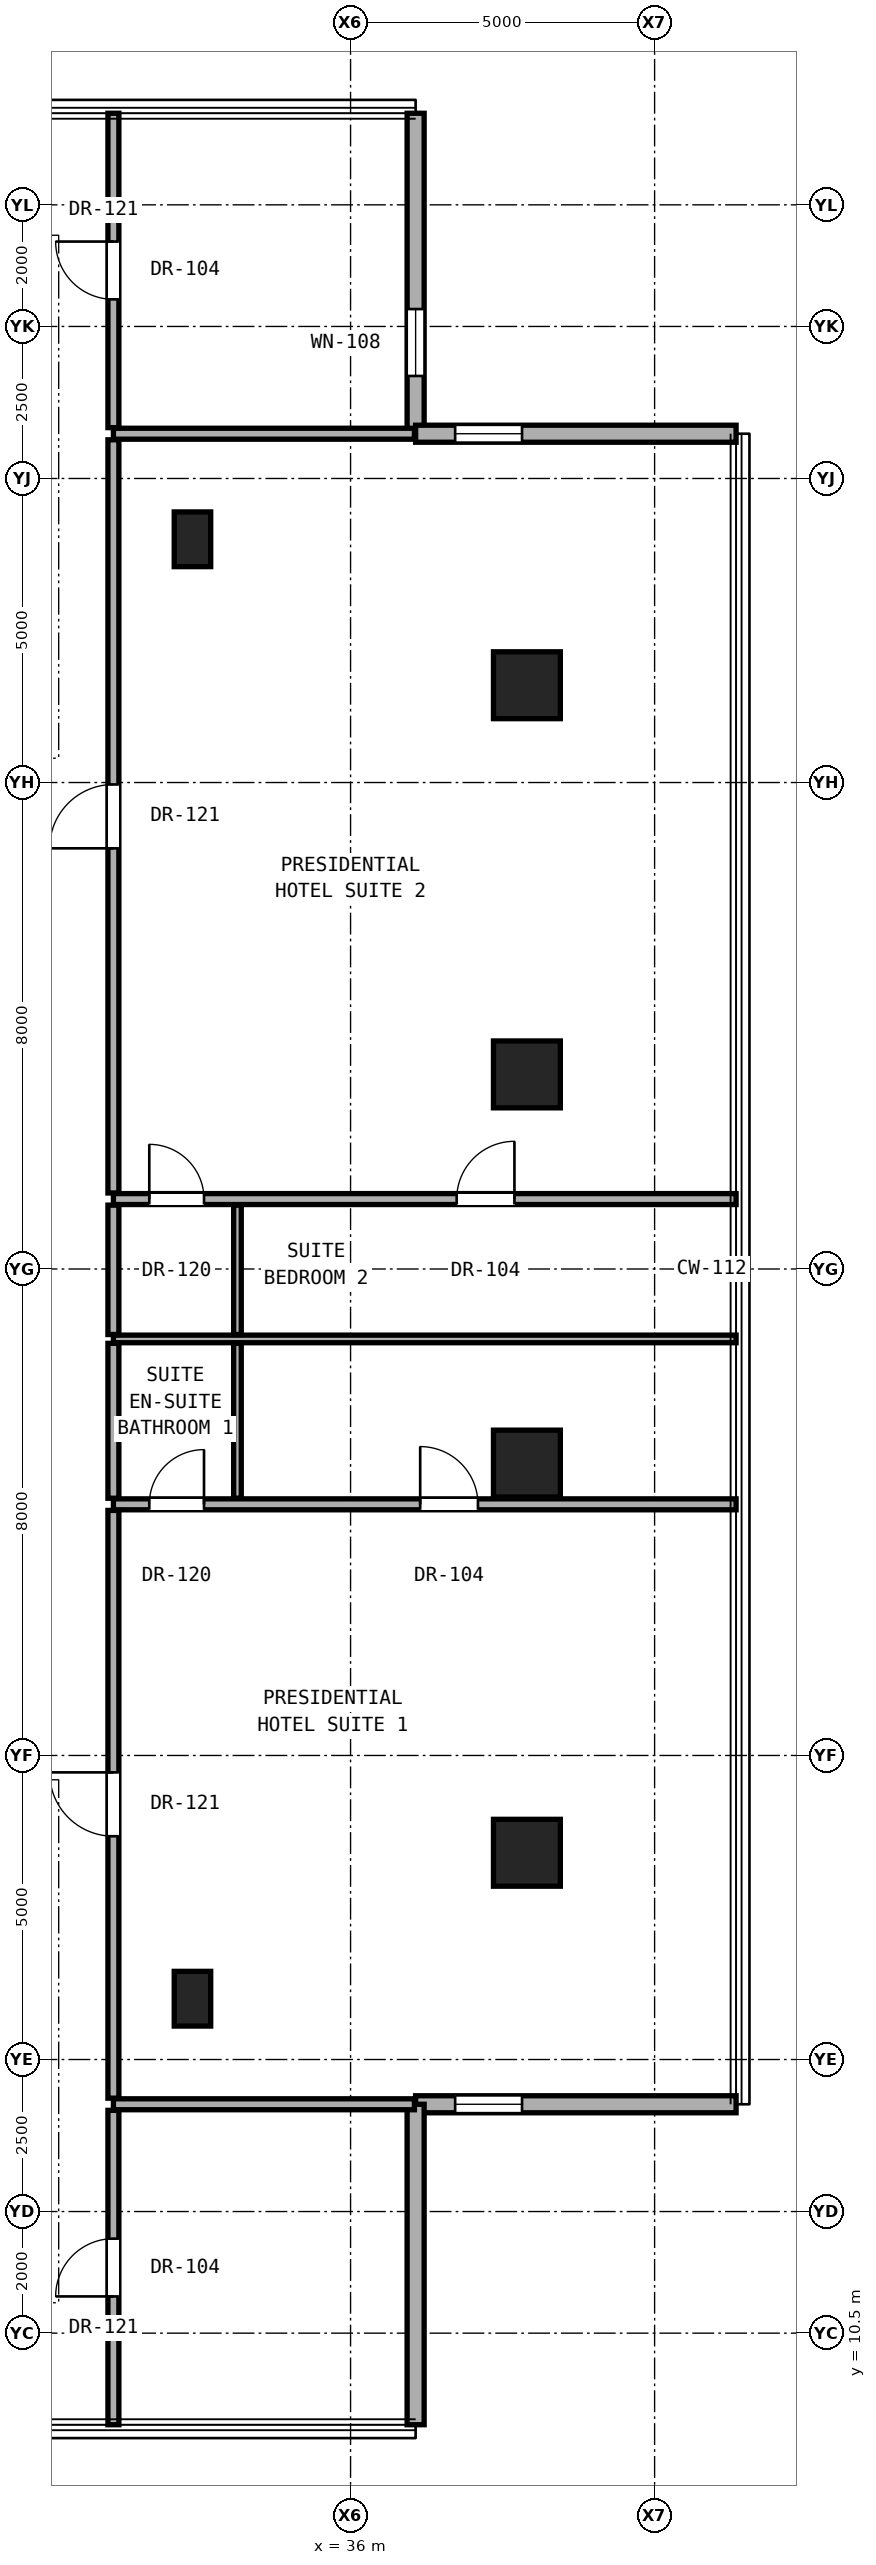
"""IFC4 building model, lengths in metres.
Left out: names, types, materials, properties, quantities, classifications, styles, units other than length and angle.
Written with IfcOpenShell. Run it as: python <this file> out.ifc"""

import sys

from ifc_helpers import new_model, si_unit, direction, frame, frame_2d, origin, origin_2d, place, context, subcontext, project, spatial, rectangle, hollow_rectangle, extrude, element, fill, save


model = new_model("IFC4")
c1 = context("Model", 3, precision=1e-05, world=origin(), true_north=direction((0.0, 1.0)))
c2 = subcontext(c1, "Body", "Model", "MODEL_VIEW")
j1 = project(units=[si_unit("LENGTHUNIT", "METRE"), si_unit("PLANEANGLEUNIT", "RADIAN")], contexts=[c1])
p1 = place(None, origin())
s1 = spatial("IfcSite", under=j1, at=p1, CompositionType="ELEMENT")
p2 = place(p1, origin())
s2 = spatial("IfcBuilding", under=s1, at=p2, CompositionType="ELEMENT")
p3 = place(p2, frame((0.0, 0.0, 141.2)))
s3 = spatial("IfcBuildingStorey", under=s2, at=p3, CompositionType="ELEMENT", Elevation=141.2)
for number, where, z_axis, x_axis in (
    (1, (38.9, 18.4, 0.0), (0.0, 0.0, 1.0), (1.0, 0.0, 0.0)),
    (2, (38.9, 24.8, 0.0), (0.0, 0.0, 1.0), (1.0, 0.0, 0.0)),
    (3, (38.9, 31.2, 0.0), (0.0, 0.0, 1.0), (1.0, 0.0, 0.0)),
    (4, (38.9, 37.6, 0.0), (0.0, 0.0, 1.0), (1.0, 0.0, 0.0)),
):
    element("IfcColumn", number, at=place(p3, frame(where, z_axis=z_axis, x_axis=x_axis)), inside=s3, PredefinedType="COLUMN", context=c2, shape_type="SweptSolid", body=[
        extrude(hollow_rectangle(XDim=1.1, YDim=1.1, WallThickness=0.06, at=origin_2d()), origin(), (0.0, 0.0, 1.0), 3.3),
    ])
for number, where, z_axis, x_axis in (
    (5, (33.4, 16.0, 0.0), (0.0, 0.0, 1.0), (1.0, 0.0, 0.0)),
    (6, (33.4, 40.0, 0.0), (0.0, 0.0, 1.0), (1.0, 0.0, 0.0)),
):
    element("IfcColumn", number, at=place(p3, frame(where, z_axis=z_axis, x_axis=x_axis)), inside=s3, PredefinedType="PILASTER", context=c2, shape_type="SweptSolid", body=[
        extrude(rectangle(XDim=0.6, YDim=0.9, at=origin_2d()), origin(), (0.0, 0.0, 1.0), 3.3),
    ])
p4 = place(p3, frame((37.07, 41.736, 0.0), z_axis=(0.0, 0.0, 1.0), x_axis=(0.0, 1.0, 0.0)))
e7 = element("IfcWall", 7, at=p4, inside=s3, PredefinedType="SOLIDWALL", context=c2, shape_type="SweptSolid", body=[
    extrude(rectangle(XDim=5.27, YDim=0.28, at=frame_2d((2.635, 0.0))), origin(), (0.0, 0.0, 1.0), 3.06),
])
p5 = place(p4, frame((0.95, 0.0, 0.85)))
e8 = element("IfcOpeningElement", 8, at=p5, cuts=e7, PredefinedType="OPENING", context=c2, shape_type="SweptSolid", body=[
    extrude(rectangle(XDim=1.1, YDim=2.0, at=frame_2d((0.55, 1.0))), frame((0.0, 0.15, 0.0), z_axis=(0.0, -1.0, 0.0), x_axis=(1.0, 0.0, 0.0)), (0.0, 0.0, 1.0), 0.3),
])
p6 = place(p3, frame((37.07, 14.264, 0.0), z_axis=(0.0, 0.0, 1.0), x_axis=(1.0, 0.0, 0.0)))
e9 = element("IfcWall", 9, at=p6, inside=s3, PredefinedType="SOLIDWALL", context=c2, shape_type="SweptSolid", body=[
    extrude(rectangle(XDim=5.27, YDim=0.28, at=frame_2d((2.635, 0.0))), origin(), (0.0, 0.0, 1.0), 3.06),
])
p7 = place(p6, frame((0.65, 0.0, 0.85)))
e10 = element("IfcOpeningElement", 10, at=p7, cuts=e9, PredefinedType="OPENING", context=c2, shape_type="SweptSolid", body=[
    extrude(rectangle(XDim=1.1, YDim=2.0, at=frame_2d((0.55, 1.0))), frame((0.0, 0.15, 0.0), z_axis=(0.0, -1.0, 0.0), x_axis=(1.0, 0.0, 0.0)), (0.0, 0.0, 1.0), 0.3),
])
p8 = place(p3, frame((37.07, 8.994, 0.0), z_axis=(0.0, 0.0, 1.0), x_axis=(0.0, 1.0, 0.0)))
e11 = element("IfcWall", 11, at=p8, inside=s3, PredefinedType="SOLIDWALL", context=c2, shape_type="SweptSolid", body=[
    extrude(rectangle(XDim=5.27, YDim=0.28, at=frame_2d((2.635, 0.0))), origin(), (0.0, 0.0, 1.0), 3.06),
])
p9 = place(p3, frame((42.34, 41.736, 0.0), z_axis=(0.0, 0.0, 1.0), x_axis=(-1.0, 0.0, 0.0)))
e12 = element("IfcWall", 12, at=p9, inside=s3, PredefinedType="SOLIDWALL", context=c2, shape_type="SweptSolid", body=[
    extrude(rectangle(XDim=5.27, YDim=0.28, at=frame_2d((2.635, 0.0))), origin(), (0.0, 0.0, 1.0), 3.06),
])
p10 = place(p9, frame((3.52, 0.0, 0.85)))
e13 = element("IfcOpeningElement", 13, at=p10, cuts=e12, PredefinedType="OPENING", context=c2, shape_type="SweptSolid", body=[
    extrude(rectangle(XDim=1.1, YDim=2.0, at=frame_2d((0.55, 1.0))), frame((0.0, 0.15, 0.0), z_axis=(0.0, -1.0, 0.0), x_axis=(1.0, 0.0, 0.0)), (0.0, 0.0, 1.0), 0.3),
])
p11 = place(p3, frame((32.1, 14.264, 0.0), z_axis=(0.0, 0.0, 1.0), x_axis=(1.0, 0.0, 0.0)))
e14 = element("IfcWall", 14, at=p11, inside=s3, PredefinedType="PARTITIONING", context=c2, shape_type="SweptSolid", body=[
    extrude(rectangle(XDim=4.95, YDim=0.18, at=frame_2d((2.475, 0.0))), origin(), (0.0, 0.0, 1.0), 3.08),
])
p12 = place(p3, frame((32.1, 24.13, 0.0), z_axis=(0.0, 0.0, 1.0), x_axis=(1.0, 0.0, 0.0)))
e15 = element("IfcWall", 15, at=p12, inside=s3, PredefinedType="PARTITIONING", context=c2, shape_type="SweptSolid", body=[
    extrude(rectangle(XDim=10.24, YDim=0.18, at=frame_2d((5.12, 0.0))), origin(), (0.0, 0.0, 1.0), 2.299),
])
p13 = place(p12, frame((5.045, 0.0, 0.0)))
e16 = element("IfcOpeningElement", 16, at=p13, cuts=e15, PredefinedType="OPENING", context=c2, shape_type="SweptSolid", body=[
    extrude(rectangle(XDim=0.95, YDim=2.15, at=frame_2d((0.475, 1.075))), frame((0.0, 0.1, 0.0), z_axis=(0.0, -1.0, 0.0), x_axis=(1.0, 0.0, 0.0)), (0.0, 0.0, 1.0), 0.2),
])
p14 = place(p12, frame((0.59, 0.0, 0.0)))
e17 = element("IfcOpeningElement", 17, at=p14, cuts=e15, PredefinedType="OPENING", context=c2, shape_type="SweptSolid", body=[
    extrude(rectangle(XDim=0.9, YDim=2.1, at=frame_2d((0.45, 1.05))), frame((0.0, 0.1, 0.0), z_axis=(0.0, -1.0, 0.0), x_axis=(1.0, 0.0, 0.0)), (0.0, 0.0, 1.0), 0.2),
])
p15 = place(p3, frame((32.1, 26.85, 0.0), z_axis=(0.0, 0.0, 1.0), x_axis=(1.0, 0.0, 0.0)))
e18 = element("IfcWall", 18, at=p15, inside=s3, PredefinedType="PARTITIONING", context=c2, shape_type="SweptSolid", body=[
    extrude(rectangle(XDim=10.24, YDim=0.125, at=frame_2d((5.12, 0.0))), origin(), (0.0, 0.0, 1.0), 2.299),
])
p16 = place(p3, frame((32.1, 29.15, 0.0), z_axis=(0.0, 0.0, 1.0), x_axis=(1.0, 0.0, 0.0)))
e19 = element("IfcWall", 19, at=p16, inside=s3, PredefinedType="PARTITIONING", context=c2, shape_type="SweptSolid", body=[
    extrude(rectangle(XDim=10.24, YDim=0.18, at=frame_2d((5.12, 0.0))), origin(), (0.0, 0.0, 1.0), 2.299),
])
p17 = place(p16, frame((5.645, 0.0, 0.0)))
e20 = element("IfcOpeningElement", 20, at=p17, cuts=e19, PredefinedType="OPENING", context=c2, shape_type="SweptSolid", body=[
    extrude(rectangle(XDim=0.95, YDim=2.15, at=frame_2d((0.475, 1.075))), frame((0.0, 0.1, 0.0), z_axis=(0.0, -1.0, 0.0), x_axis=(1.0, 0.0, 0.0)), (0.0, 0.0, 1.0), 0.2),
])
p18 = place(p16, frame((0.59, 0.0, 0.0)))
e21 = element("IfcOpeningElement", 21, at=p18, cuts=e19, PredefinedType="OPENING", context=c2, shape_type="SweptSolid", body=[
    extrude(rectangle(XDim=0.9, YDim=2.1, at=frame_2d((0.45, 1.05))), frame((0.0, 0.1, 0.0), z_axis=(0.0, -1.0, 0.0), x_axis=(1.0, 0.0, 0.0)), (0.0, 0.0, 1.0), 0.2),
])
p19 = place(p3, frame((32.1, 41.736, 0.0), z_axis=(0.0, 0.0, 1.0), x_axis=(1.0, 0.0, 0.0)))
e22 = element("IfcWall", 22, at=p19, inside=s3, PredefinedType="PARTITIONING", context=c2, shape_type="SweptSolid", body=[
    extrude(rectangle(XDim=4.95, YDim=0.18, at=frame_2d((2.475, 0.0))), origin(), (0.0, 0.0, 1.0), 3.08),
])
p20 = place(p3, frame((32.1, 8.994, 0.0), z_axis=(0.0, 0.0, 1.0), x_axis=(0.0, 1.0, 0.0)))
e23 = element("IfcWall", 23, at=p20, inside=s3, PredefinedType="PARTITIONING", context=c2, shape_type="SweptSolid", body=[
    extrude(rectangle(XDim=5.17, YDim=0.18, at=frame_2d((2.585, 0.0))), origin(), (0.0, 0.0, 1.0), 3.08),
])
p21 = place(p20, frame((2.11, 0.0, 0.0)))
e24 = element("IfcOpeningElement", 24, at=p21, cuts=e23, PredefinedType="OPENING", context=c2, shape_type="SweptSolid", body=[
    extrude(rectangle(XDim=0.95, YDim=2.15, at=frame_2d((0.475, 1.075))), frame((0.0, 0.1, 0.0), z_axis=(0.0, -1.0, 0.0), x_axis=(1.0, 0.0, 0.0)), (0.0, 0.0, 1.0), 0.2),
])
p22 = place(p3, frame((32.1, 14.364, 0.0), z_axis=(0.0, 0.0, 1.0), x_axis=(0.0, 1.0, 0.0)))
e25 = element("IfcWall", 25, at=p22, inside=s3, PredefinedType="PARTITIONING", context=c2, shape_type="SweptSolid", body=[
    extrude(rectangle(XDim=9.666, YDim=0.18, at=frame_2d((4.833, 0.0))), origin(), (0.0, 0.0, 1.0), 2.456),
])
p23 = place(p22, frame((4.308, 0.0, 0.0)))
e26 = element("IfcOpeningElement", 26, at=p23, cuts=e25, PredefinedType="OPENING", context=c2, shape_type="SweptSolid", body=[
    extrude(rectangle(XDim=1.05, YDim=2.2, at=frame_2d((0.525, 1.1))), frame((0.0, 0.1, 0.0), z_axis=(0.0, -1.0, 0.0), x_axis=(1.0, 0.0, 0.0)), (0.0, 0.0, 1.0), 0.2),
])
p24 = place(p3, frame((32.1, 24.23, 0.0), z_axis=(0.0, 0.0, 1.0), x_axis=(0.0, 1.0, 0.0)))
e27 = element("IfcWall", 27, at=p24, inside=s3, PredefinedType="PARTITIONING", context=c2, shape_type="SweptSolid", body=[
    extrude(rectangle(XDim=2.548, YDim=0.18, at=frame_2d((1.274, 0.0))), origin(), (0.0, 0.0, 1.0), 2.299),
])
p25 = place(p3, frame((32.1, 26.923, 0.0), z_axis=(0.0, 0.0, 1.0), x_axis=(0.0, 1.0, 0.0)))
e28 = element("IfcWall", 28, at=p25, inside=s3, PredefinedType="PARTITIONING", context=c2, shape_type="SweptSolid", body=[
    extrude(rectangle(XDim=2.127, YDim=0.18, at=frame_2d((1.064, 0.0))), origin(), (0.0, 0.0, 1.0), 3.08),
])
p26 = place(p3, frame((32.1, 29.25, 0.0), z_axis=(0.0, 0.0, 1.0), x_axis=(0.0, 1.0, 0.0)))
e29 = element("IfcWall", 29, at=p26, inside=s3, PredefinedType="PARTITIONING", context=c2, shape_type="SweptSolid", body=[
    extrude(rectangle(XDim=12.386, YDim=0.18, at=frame_2d((6.193, 0.0))), origin(), (0.0, 0.0, 1.0), 2.299),
])
p27 = place(p26, frame((5.668, 0.0, 0.0)))
e30 = element("IfcOpeningElement", 30, at=p27, cuts=e29, PredefinedType="OPENING", context=c2, shape_type="SweptSolid", body=[
    extrude(rectangle(XDim=1.05, YDim=2.2, at=frame_2d((0.525, 1.1))), frame((0.0, 0.1, 0.0), z_axis=(0.0, -1.0, 0.0), x_axis=(1.0, 0.0, 0.0)), (0.0, 0.0, 1.0), 0.2),
])
p28 = place(p3, frame((32.1, 41.836, 0.0), z_axis=(0.0, 0.0, 1.0), x_axis=(0.0, 1.0, 0.0)))
e31 = element("IfcWall", 31, at=p28, inside=s3, PredefinedType="PARTITIONING", context=c2, shape_type="SweptSolid", body=[
    extrude(rectangle(XDim=5.17, YDim=0.18, at=frame_2d((2.585, 0.0))), origin(), (0.0, 0.0, 1.0), 3.08),
])
p29 = place(p28, frame((2.11, 0.0, 0.0)))
e32 = element("IfcOpeningElement", 32, at=p29, cuts=e31, PredefinedType="OPENING", context=c2, shape_type="SweptSolid", body=[
    extrude(rectangle(XDim=0.95, YDim=2.15, at=frame_2d((0.475, 1.075))), frame((0.0, 0.1, 0.0), z_axis=(0.0, -1.0, 0.0), x_axis=(1.0, 0.0, 0.0)), (0.0, 0.0, 1.0), 0.2),
])
p30 = place(p3, frame((34.14, 24.23, 0.0), z_axis=(0.0, 0.0, 1.0), x_axis=(0.0, 1.0, 0.0)))
e33 = element("IfcWall", 33, at=p30, inside=s3, PredefinedType="PARTITIONING", context=c2, shape_type="SweptSolid", body=[
    extrude(rectangle(XDim=2.548, YDim=0.125, at=frame_2d((1.274, 0.0))), origin(), (0.0, 0.0, 1.0), 2.299),
])
p31 = place(p3, frame((34.14, 26.923, 0.0), z_axis=(0.0, 0.0, 1.0), x_axis=(0.0, 1.0, 0.0)))
e34 = element("IfcWall", 34, at=p31, inside=s3, PredefinedType="PARTITIONING", context=c2, shape_type="SweptSolid", body=[
    extrude(rectangle(XDim=2.127, YDim=0.125, at=frame_2d((1.064, 0.0))), origin(), (0.0, 0.0, 1.0), 3.08),
])
p32 = place(p5, origin())
e35 = element("IfcWindow", 35, at=p32, inside=s3, PartitioningType="SINGLE_PANEL", PredefinedType="WINDOW", context=c2, shape_type="SweptSolid", body=[
    extrude(rectangle(XDim=1.1, YDim=2.0, at=frame_2d((0.55, 1.0))), frame((0.0, 0.03, 0.0), z_axis=(0.0, -1.0, 0.0), x_axis=(1.0, 0.0, 0.0)), (0.0, 0.0, 1.0), 0.06),
])
fill(e8, e35)
p33 = place(p7, origin())
e36 = element("IfcWindow", 36, at=p33, inside=s3, PartitioningType="SINGLE_PANEL", PredefinedType="WINDOW", context=c2, shape_type="SweptSolid", body=[
    extrude(rectangle(XDim=1.1, YDim=2.0, at=frame_2d((0.55, 1.0))), frame((0.0, 0.03, 0.0), z_axis=(0.0, -1.0, 0.0), x_axis=(1.0, 0.0, 0.0)), (0.0, 0.0, 1.0), 0.06),
])
fill(e10, e36)
p34 = place(p10, origin())
e37 = element("IfcWindow", 37, at=p34, inside=s3, PartitioningType="SINGLE_PANEL", PredefinedType="WINDOW", context=c2, shape_type="SweptSolid", body=[
    extrude(rectangle(XDim=1.1, YDim=2.0, at=frame_2d((0.55, 1.0))), frame((0.0, 0.03, 0.0), z_axis=(0.0, -1.0, 0.0), x_axis=(1.0, 0.0, 0.0)), (0.0, 0.0, 1.0), 0.06),
])
fill(e13, e37)
p35 = place(p23, origin())
e38 = element("IfcDoor", 38, at=p35, inside=s3, OperationType="SINGLE_SWING_RIGHT", PredefinedType="DOOR", context=c2, shape_type="SweptSolid", body=[
    extrude(rectangle(XDim=1.05, YDim=2.2, at=frame_2d((0.525, 1.1))), frame((0.0, 0.025, 0.0), z_axis=(0.0, -1.0, 0.0), x_axis=(1.0, 0.0, 0.0)), (0.0, 0.0, 1.0), 0.05),
])
fill(e26, e38)
p36 = place(p13, origin())
e39 = element("IfcDoor", 39, at=p36, inside=s3, OperationType="SINGLE_SWING_LEFT", PredefinedType="DOOR", context=c2, shape_type="SweptSolid", body=[
    extrude(rectangle(XDim=0.95, YDim=2.15, at=frame_2d((0.475, 1.075))), frame((0.0, 0.025, 0.0), z_axis=(0.0, -1.0, 0.0), x_axis=(1.0, 0.0, 0.0)), (0.0, 0.0, 1.0), 0.05),
])
fill(e16, e39)
p37 = place(p14, origin())
e40 = element("IfcDoor", 40, at=p37, inside=s3, OperationType="SINGLE_SWING_RIGHT", PredefinedType="DOOR", context=c2, shape_type="SweptSolid", body=[
    extrude(rectangle(XDim=0.9, YDim=2.1, at=frame_2d((0.45, 1.05))), frame((0.0, 0.025, 0.0), z_axis=(0.0, -1.0, 0.0), x_axis=(1.0, 0.0, 0.0)), (0.0, 0.0, 1.0), 0.05),
])
fill(e17, e40)
p38 = place(p27, origin())
e41 = element("IfcDoor", 41, at=p38, inside=s3, OperationType="SINGLE_SWING_LEFT", PredefinedType="DOOR", context=c2, shape_type="SweptSolid", body=[
    extrude(rectangle(XDim=1.05, YDim=2.2, at=frame_2d((0.525, 1.1))), frame((0.0, 0.025, 0.0), z_axis=(0.0, -1.0, 0.0), x_axis=(1.0, 0.0, 0.0)), (0.0, 0.0, 1.0), 0.05),
])
fill(e30, e41)
p39 = place(p17, origin())
e42 = element("IfcDoor", 42, at=p39, inside=s3, OperationType="SINGLE_SWING_RIGHT", PredefinedType="DOOR", context=c2, shape_type="SweptSolid", body=[
    extrude(rectangle(XDim=0.95, YDim=2.15, at=frame_2d((0.475, 1.075))), frame((0.0, 0.025, 0.0), z_axis=(0.0, -1.0, 0.0), x_axis=(1.0, 0.0, 0.0)), (0.0, 0.0, 1.0), 0.05),
])
fill(e20, e42)
p40 = place(p18, origin())
e43 = element("IfcDoor", 43, at=p40, inside=s3, OperationType="SINGLE_SWING_LEFT", PredefinedType="DOOR", context=c2, shape_type="SweptSolid", body=[
    extrude(rectangle(XDim=0.9, YDim=2.1, at=frame_2d((0.45, 1.05))), frame((0.0, 0.025, 0.0), z_axis=(0.0, -1.0, 0.0), x_axis=(1.0, 0.0, 0.0)), (0.0, 0.0, 1.0), 0.05),
])
fill(e21, e43)
p41 = place(p21, origin())
e44 = element("IfcDoor", 44, at=p41, inside=s3, OperationType="SINGLE_SWING_LEFT", PredefinedType="DOOR", context=c2, shape_type="SweptSolid", body=[
    extrude(rectangle(XDim=0.95, YDim=2.15, at=frame_2d((0.475, 1.075))), frame((0.0, 0.025, 0.0), z_axis=(0.0, -1.0, 0.0), x_axis=(1.0, 0.0, 0.0)), (0.0, 0.0, 1.0), 0.05),
])
fill(e24, e44)
p42 = place(p29, origin())
e45 = element("IfcDoor", 45, at=p42, inside=s3, OperationType="SINGLE_SWING_RIGHT", PredefinedType="DOOR", context=c2, shape_type="SweptSolid", body=[
    extrude(rectangle(XDim=0.95, YDim=2.15, at=frame_2d((0.475, 1.075))), frame((0.0, 0.025, 0.0), z_axis=(0.0, -1.0, 0.0), x_axis=(1.0, 0.0, 0.0)), (0.0, 0.0, 1.0), 0.05),
])
fill(e32, e45)
save(model, sys.argv[1])
